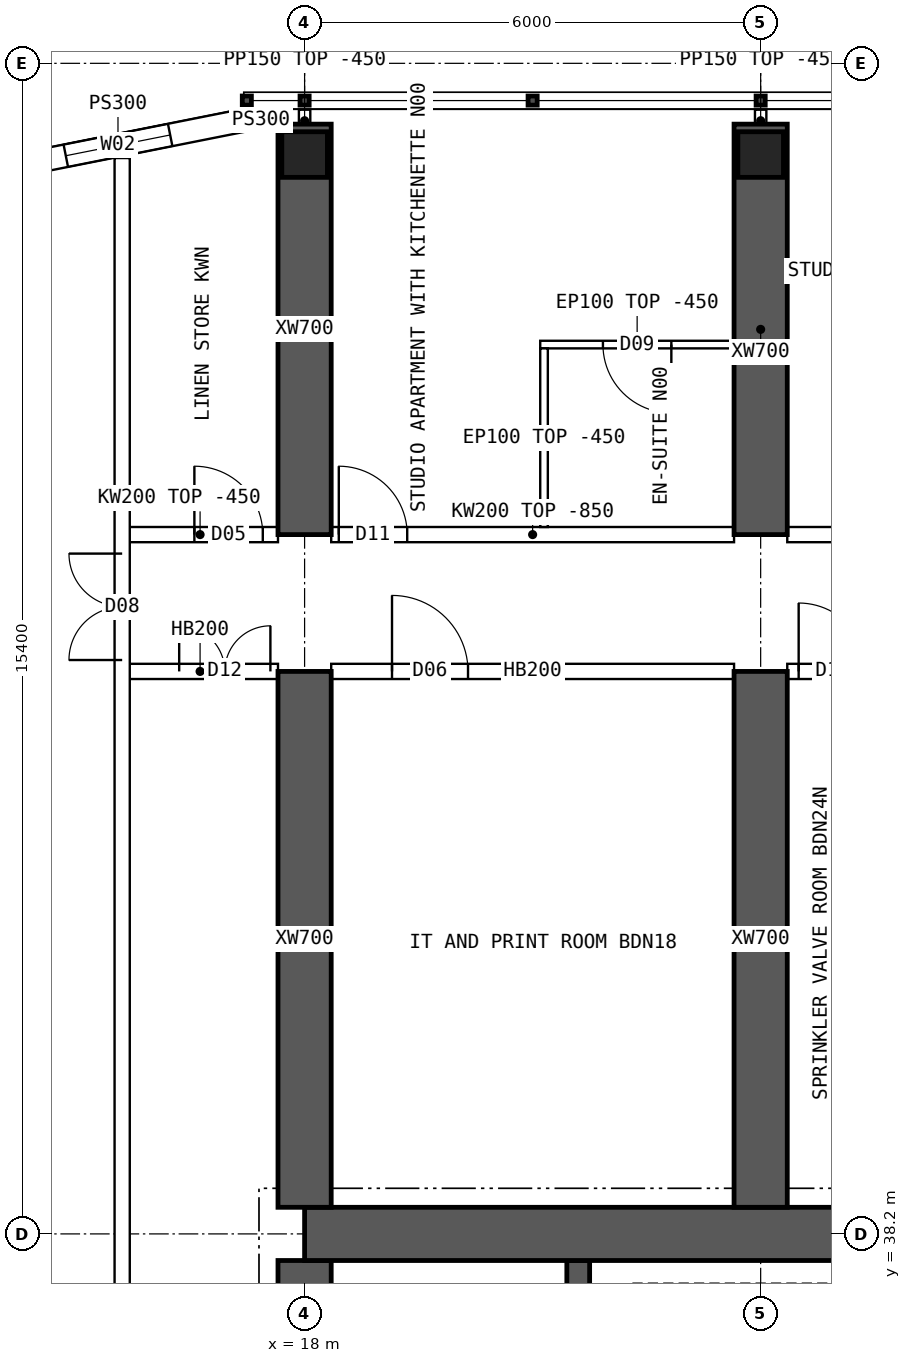
"""IFC4 building model, lengths in metres.
Left out: names, types, materials, properties, quantities, classifications, styles, units other than length and angle.
Written with IfcOpenShell. Run it as: python <this file> out.ifc"""

import sys

from ifc_helpers import new_model, si_unit, direction, frame, frame_2d, origin, origin_2d, place, context, subcontext, project, spatial, polyline, rectangle, hollow_rectangle, outline, extrude, element, fill, save


model = new_model("IFC4")
c1 = context("Model", 3, precision=1e-05, world=origin(), true_north=direction((0.0, 1.0)))
c2 = subcontext(c1, "Body", "Model", "MODEL_VIEW")
j1 = project(units=[si_unit("LENGTHUNIT", "METRE"), si_unit("PLANEANGLEUNIT", "RADIAN")], contexts=[c1])
p1 = place(None, origin())
s1 = spatial("IfcSite", under=j1, at=p1, CompositionType="ELEMENT")
p2 = place(p1, origin())
s2 = spatial("IfcBuilding", under=s1, at=p2, CompositionType="ELEMENT")
p3 = place(p2, frame((0.0, 0.0, 212.8)))
s3 = spatial("IfcBuildingStorey", under=s2, at=p3, CompositionType="ELEMENT", Elevation=212.8)
for number, where, z_axis, x_axis in (
    (1, (18.0, 52.4, 0.0), (0.0, 0.0, 1.0), (1.0, 0.0, 0.0)),
    (2, (24.0, 52.4, 0.0), (0.0, 0.0, 1.0), (1.0, 0.0, 0.0)),
):
    element("IfcColumn", number, at=place(p3, frame(where, z_axis=z_axis, x_axis=x_axis)), inside=s3, PredefinedType="COLUMN", context=c2, shape_type="SweptSolid", body=[
        extrude(hollow_rectangle(XDim=0.6, YDim=0.6, WallThickness=0.06, at=origin_2d()), origin(), (0.0, 0.0, 1.0), 3.75),
    ])
p4 = place(p3, frame((18.0, 38.2, 0.0), z_axis=(0.0, 0.0, 1.0), x_axis=(1.0, 0.0, 0.0)))
e3 = element("IfcWall", 3, at=p4, inside=s3, PredefinedType="SHEAR", context=c2, shape_type="SweptSolid", body=[
    extrude(rectangle(XDim=48.0, YDim=0.7, at=frame_2d((24.0, 0.0))), origin(), (0.0, 0.0, 1.0), 3.75),
])
p5 = place(p3, frame((18.0, 26.15, 0.0), z_axis=(0.0, 0.0, 1.0), x_axis=(0.0, 1.0, 0.0)))
e4 = element("IfcWall", 4, at=p5, inside=s3, PredefinedType="SHEAR", context=c2, shape_type="SweptSolid", body=[
    extrude(rectangle(XDim=11.7, YDim=0.7, at=frame_2d((5.85, 0.0))), origin(), (0.0, 0.0, 1.0), 3.75),
])
p6 = place(p5, frame((5.15, 0.0, 0.0)))
e5 = element("IfcOpeningElement", 5, at=p6, cuts=e4, PredefinedType="OPENING", context=c2, shape_type="SweptSolid", body=[
    extrude(rectangle(XDim=1.2, YDim=2.1, at=frame_2d((0.6, 1.05))), frame((0.0, 0.36, 0.0), z_axis=(0.0, -1.0, 0.0), x_axis=(1.0, 0.0, 0.0)), (0.0, 0.0, 1.0), 0.72),
])
p7 = place(p3, frame((21.6, 34.75, 0.0), z_axis=(0.0, 0.0, 1.0), x_axis=(0.0, 1.0, 0.0)))
e6 = element("IfcWall", 6, at=p7, inside=s3, PredefinedType="SHEAR", context=c2, shape_type="SweptSolid", body=[
    extrude(rectangle(XDim=3.1, YDim=0.3, at=frame_2d((1.55, 0.0))), origin(), (0.0, 0.0, 1.0), 3.75),
])
p8 = place(p3, frame((18.0, 47.4, 0.0), z_axis=(0.0, 0.0, 1.0), x_axis=(0.0, 1.0, 0.0)))
e7 = element("IfcWall", 7, at=p8, inside=s3, PredefinedType="SHEAR", context=c2, shape_type="SweptSolid", body=[
    extrude(rectangle(XDim=5.4, YDim=0.7, at=frame_2d((2.7, 0.0))), origin(), (0.0, 0.0, 1.0), 3.75),
])
p9 = place(p3, frame((18.0, 38.55, 0.0), z_axis=(0.0, 0.0, 1.0), x_axis=(0.0, 1.0, 0.0)))
e8 = element("IfcWall", 8, at=p9, inside=s3, PredefinedType="SHEAR", context=c2, shape_type="SweptSolid", body=[
    extrude(rectangle(XDim=7.05, YDim=0.7, at=frame_2d((3.525, 0.0))), origin(), (0.0, 0.0, 1.0), 3.75),
])
p10 = place(p3, frame((24.0, 47.4, 0.0), z_axis=(0.0, 0.0, 1.0), x_axis=(0.0, 1.0, 0.0)))
e9 = element("IfcWall", 9, at=p10, inside=s3, PredefinedType="SHEAR", context=c2, shape_type="SweptSolid", body=[
    extrude(rectangle(XDim=5.4, YDim=0.7, at=frame_2d((2.7, 0.0))), origin(), (0.0, 0.0, 1.0), 3.75),
])
p11 = place(p3, frame((24.0, 38.55, 0.0), z_axis=(0.0, 0.0, 1.0), x_axis=(0.0, 1.0, 0.0)))
e10 = element("IfcWall", 10, at=p11, inside=s3, PredefinedType="SHEAR", context=c2, shape_type="SweptSolid", body=[
    extrude(rectangle(XDim=7.05, YDim=0.7, at=frame_2d((3.525, 0.0))), origin(), (0.0, 0.0, 1.0), 3.75),
])
p12 = place(p3, frame((17.2, 52.85, 0.0), z_axis=(0.0, 0.0, 1.0), x_axis=(-0.98078325777, -0.195100490205, 0.0)))
e11 = element("IfcWall", 11, at=p12, inside=s3, PredefinedType="SOLIDWALL", context=c2, shape_type="SweptSolid", body=[
    extrude(outline(polyline([(-0.03, -0.15), (3.405, -0.15), (3.345, 0.15), (0.03, 0.15), (-0.03, -0.15)])), origin(), (0.0, 0.0, 1.0), 3.3),
])
p13 = place(p12, frame((0.988, 0.0, 0.9)))
e12 = element("IfcOpeningElement", 12, at=p13, cuts=e11, PredefinedType="OPENING", context=c2, shape_type="SweptSolid", body=[
    extrude(rectangle(XDim=1.4, YDim=1.8, at=frame_2d((0.7, 0.9))), frame((0.0, 0.16, 0.0), z_axis=(0.0, -1.0, 0.0), x_axis=(1.0, 0.0, 0.0)), (0.0, 0.0, 1.0), 0.32),
])
p14 = place(p3, frame((17.2, 52.85, 0.0), z_axis=(0.0, 0.0, 1.0), x_axis=(1.0, 0.0, 0.0)))
e13 = element("IfcWall", 13, at=p14, inside=s3, PredefinedType="SOLIDWALL", context=c2, shape_type="SweptSolid", body=[
    extrude(rectangle(XDim=0.45, YDim=0.3, at=frame_2d((0.225, 0.0))), origin(), (0.0, 0.0, 1.0), 3.3),
])
p15 = place(p3, frame((15.6, 47.4, 0.0), z_axis=(0.0, 0.0, 1.0), x_axis=(1.0, 0.0, 0.0)))
e14 = element("IfcWall", 14, at=p15, inside=s3, PredefinedType="SOLIDWALL", context=c2, shape_type="SweptSolid", body=[
    extrude(rectangle(XDim=2.05, YDim=0.2, at=frame_2d((1.025, 0.0))), origin(), (0.0, 0.0, 1.0), 3.3),
])
p16 = place(p15, frame((0.95, 0.0, 0.0)))
e15 = element("IfcOpeningElement", 15, at=p16, cuts=e14, PredefinedType="OPENING", context=c2, shape_type="SweptSolid", body=[
    extrude(rectangle(XDim=0.9, YDim=2.1, at=frame_2d((0.45, 1.05))), frame((0.0, 0.11, 0.0), z_axis=(0.0, -1.0, 0.0), x_axis=(1.0, 0.0, 0.0)), (0.0, 0.0, 1.0), 0.22),
])
p17 = place(p3, frame((15.6, 45.6, 0.0), z_axis=(0.0, 0.0, 1.0), x_axis=(1.0, 0.0, 0.0)))
e16 = element("IfcWall", 16, at=p17, inside=s3, PredefinedType="SOLIDWALL", context=c2, shape_type="SweptSolid", body=[
    extrude(rectangle(XDim=2.05, YDim=0.2, at=frame_2d((1.025, 0.0))), origin(), (0.0, 0.0, 1.0), 3.3),
])
p18 = place(p17, frame((0.75, 0.0, 0.0)))
e17 = element("IfcOpeningElement", 17, at=p18, cuts=e16, PredefinedType="OPENING", context=c2, shape_type="SweptSolid", body=[
    extrude(rectangle(XDim=1.2, YDim=2.1, at=frame_2d((0.6, 1.05))), frame((0.0, 0.11, 0.0), z_axis=(0.0, -1.0, 0.0), x_axis=(1.0, 0.0, 0.0)), (0.0, 0.0, 1.0), 0.22),
])
p19 = place(p3, frame((18.35, 47.4, 0.0), z_axis=(0.0, 0.0, 1.0), x_axis=(1.0, 0.0, 0.0)))
e18 = element("IfcWall", 18, at=p19, inside=s3, PredefinedType="SOLIDWALL", context=c2, shape_type="SweptSolid", body=[
    extrude(outline(polyline([(0.0, 0.0), (5.3, 0.0), (5.3, 2.9), (0.0, 2.9), (0.0, 0.0)])), frame((0.0, 0.1, 0.0), z_axis=(0.0, -1.0, 0.0), x_axis=(1.0, 0.0, 0.0)), (0.0, 0.0, 1.0), 0.2),
])
p20 = place(p19, frame((0.1, 0.0, 0.0)))
e19 = element("IfcOpeningElement", 19, at=p20, cuts=e18, PredefinedType="OPENING", context=c2, shape_type="SweptSolid", body=[
    extrude(rectangle(XDim=0.9, YDim=2.1, at=frame_2d((0.45, 1.05))), frame((0.0, 0.11, 0.0), z_axis=(0.0, -1.0, 0.0), x_axis=(1.0, 0.0, 0.0)), (0.0, 0.0, 1.0), 0.22),
])
p21 = place(p3, frame((18.35, 45.6, 0.0), z_axis=(0.0, 0.0, 1.0), x_axis=(1.0, 0.0, 0.0)))
e20 = element("IfcWall", 20, at=p21, inside=s3, PredefinedType="SOLIDWALL", context=c2, shape_type="SweptSolid", body=[
    extrude(rectangle(XDim=5.3, YDim=0.2, at=frame_2d((2.65, 0.0))), origin(), (0.0, 0.0, 1.0), 3.3),
])
p22 = place(p21, frame((0.8, 0.0, 0.0)))
e21 = element("IfcOpeningElement", 21, at=p22, cuts=e20, PredefinedType="OPENING", context=c2, shape_type="SweptSolid", body=[
    extrude(rectangle(XDim=1.0, YDim=2.1, at=frame_2d((0.5, 1.05))), frame((0.0, 0.11, 0.0), z_axis=(0.0, -1.0, 0.0), x_axis=(1.0, 0.0, 0.0)), (0.0, 0.0, 1.0), 0.22),
])
p23 = place(p3, frame((24.35, 47.4, 0.0), z_axis=(0.0, 0.0, 1.0), x_axis=(1.0, 0.0, 0.0)))
e22 = element("IfcWall", 22, at=p23, inside=s3, PredefinedType="SOLIDWALL", context=c2, shape_type="SweptSolid", body=[
    extrude(outline(polyline([(0.0, 0.0), (5.3, 0.0), (5.3, 2.9), (0.0, 2.9), (0.0, 0.0)])), frame((0.0, 0.1, 0.0), z_axis=(0.0, -1.0, 0.0), x_axis=(1.0, 0.0, 0.0)), (0.0, 0.0, 1.0), 0.2),
])
p24 = place(p23, frame((2.3, 0.0, 0.0)))
e23 = element("IfcOpeningElement", 23, at=p24, cuts=e22, PredefinedType="OPENING", context=c2, shape_type="SweptSolid", body=[
    extrude(rectangle(XDim=0.9, YDim=2.1, at=frame_2d((0.45, 1.05))), frame((0.0, 0.11, 0.0), z_axis=(0.0, -1.0, 0.0), x_axis=(1.0, 0.0, 0.0)), (0.0, 0.0, 1.0), 0.22),
])
p25 = place(p3, frame((24.35, 45.6, 0.0), z_axis=(0.0, 0.0, 1.0), x_axis=(1.0, 0.0, 0.0)))
e24 = element("IfcWall", 24, at=p25, inside=s3, PredefinedType="SOLIDWALL", context=c2, shape_type="SweptSolid", body=[
    extrude(rectangle(XDim=5.3, YDim=0.2, at=frame_2d((2.65, 0.0))), origin(), (0.0, 0.0, 1.0), 3.3),
])
p26 = place(p25, frame((0.15, 0.0, 0.0)))
e25 = element("IfcOpeningElement", 25, at=p26, cuts=e24, PredefinedType="OPENING", context=c2, shape_type="SweptSolid", body=[
    extrude(rectangle(XDim=0.9, YDim=2.1, at=frame_2d((0.45, 1.05))), frame((0.0, 0.11, 0.0), z_axis=(0.0, -1.0, 0.0), x_axis=(1.0, 0.0, 0.0)), (0.0, 0.0, 1.0), 0.22),
])
p27 = place(p25, frame((2.28, 0.0, 0.0)))
e26 = element("IfcOpeningElement", 26, at=p27, cuts=e24, PredefinedType="OPENING", context=c2, shape_type="SweptSolid", body=[
    extrude(rectangle(XDim=0.9, YDim=2.1, at=frame_2d((0.45, 1.05))), frame((0.0, 0.11, 0.0), z_axis=(0.0, -1.0, 0.0), x_axis=(1.0, 0.0, 0.0)), (0.0, 0.0, 1.0), 0.22),
])
p28 = place(p3, frame((21.1, 49.9, 0.0), z_axis=(0.0, 0.0, 1.0), x_axis=(1.0, 0.0, 0.0)))
e27 = element("IfcWall", 27, at=p28, inside=s3, PredefinedType="PARTITIONING", context=c2, shape_type="SweptSolid", body=[
    extrude(rectangle(XDim=2.55, YDim=0.1, at=frame_2d((1.275, 0.0))), origin(), (0.0, 0.0, 1.0), 3.3),
])
p29 = place(p28, frame((0.825, 0.0, 0.0)))
e28 = element("IfcOpeningElement", 28, at=p29, cuts=e27, PredefinedType="OPENING", context=c2, shape_type="SweptSolid", body=[
    extrude(rectangle(XDim=0.9, YDim=2.1, at=frame_2d((0.45, 1.05))), frame((0.0, 0.06, 0.0), z_axis=(0.0, -1.0, 0.0), x_axis=(1.0, 0.0, 0.0)), (0.0, 0.0, 1.0), 0.12),
])
p30 = place(p3, frame((21.15, 49.85, 0.0), z_axis=(0.0, 0.0, 1.0), x_axis=(0.0, -1.0, 0.0)))
e29 = element("IfcWall", 29, at=p30, inside=s3, PredefinedType="PARTITIONING", context=c2, shape_type="SweptSolid", body=[
    extrude(outline(polyline([(0.0, 0.0), (2.35, 0.0), (2.35, 2.9), (2.302, 2.9), (2.3, 3.3), (0.0, 3.3), (0.0, 0.0)])), frame((0.0, 0.05, 0.0), z_axis=(0.0, -1.0, 0.0), x_axis=(1.0, 0.0, 0.0)), (0.0, 0.0, 1.0), 0.1),
])
p31 = place(p3, frame((15.6, 11.646, 0.0), z_axis=(0.0, 0.0, 1.0), x_axis=(0.0, 1.0, 0.0)))
e30 = element("IfcWall", 30, at=p31, inside=s3, PredefinedType="SOLIDWALL", context=c2, shape_type="SweptSolid", body=[
    extrude(rectangle(XDim=40.708, YDim=0.2, at=frame_2d((20.354, 0.0))), origin(), (0.0, 0.0, 1.0), 3.3),
])
p32 = place(p31, frame((13.434, 0.0, 0.0)))
e31 = element("IfcOpeningElement", 31, at=p32, cuts=e30, PredefinedType="OPENING", context=c2, shape_type="SweptSolid", body=[
    extrude(rectangle(XDim=1.2, YDim=2.1, at=frame_2d((0.6, 1.05))), frame((0.0, 0.11, 0.0), z_axis=(0.0, -1.0, 0.0), x_axis=(1.0, 0.0, 0.0)), (0.0, 0.0, 1.0), 0.22),
])
p33 = place(p31, frame((5.104, 0.0, 0.0)))
e32 = element("IfcOpeningElement", 32, at=p33, cuts=e30, PredefinedType="OPENING", context=c2, shape_type="SweptSolid", body=[
    extrude(rectangle(XDim=1.4, YDim=2.1, at=frame_2d((0.7, 1.05))), frame((0.0, 0.11, 0.0), z_axis=(0.0, -1.0, 0.0), x_axis=(1.0, 0.0, 0.0)), (0.0, 0.0, 1.0), 0.22),
])
p34 = place(p31, frame((34.104, 0.0, 0.0)))
e33 = element("IfcOpeningElement", 33, at=p34, cuts=e30, PredefinedType="OPENING", context=c2, shape_type="SweptSolid", body=[
    extrude(rectangle(XDim=1.4, YDim=2.1, at=frame_2d((0.7, 1.05))), frame((0.0, 0.11, 0.0), z_axis=(0.0, -1.0, 0.0), x_axis=(1.0, 0.0, 0.0)), (0.0, 0.0, 1.0), 0.22),
])
for number, where, z_axis, x_axis in (
    (34, (18.0, 52.7, 0.0), (0.0, 0.0, 1.0), (0.0, 1.0, 0.0)),
    (35, (24.0, 52.7, 0.0), (0.0, 0.0, 1.0), (0.0, 1.0, 0.0)),
):
    element("IfcWall", number, at=place(p3, frame(where, z_axis=z_axis, x_axis=x_axis)), inside=s3, PredefinedType="PARTITIONING", context=c2, shape_type="SweptSolid", body=[
        extrude(rectangle(XDim=0.29, YDim=0.15, at=frame_2d((0.145, 0.0))), origin(), (0.0, 0.0, 1.0), 3.3),
    ])
p35 = place(p13, origin())
e36 = element("IfcWindow", 36, at=p35, inside=s3, PartitioningType="SINGLE_PANEL", PredefinedType="WINDOW", context=c2, shape_type="SweptSolid", body=[
    extrude(rectangle(XDim=1.4, YDim=1.8, at=frame_2d((0.7, 0.9))), frame((0.0, 0.03, 0.0), z_axis=(0.0, -1.0, 0.0), x_axis=(1.0, 0.0, 0.0)), (0.0, 0.0, 1.0), 0.06),
])
fill(e12, e36)
p36 = place(p18, origin())
e37 = element("IfcDoor", 37, at=p36, inside=s3, OperationType="DOUBLE_DOOR_SINGLE_SWING", PredefinedType="DOOR", context=c2, shape_type="SweptSolid", body=[
    extrude(rectangle(XDim=1.2, YDim=2.1, at=frame_2d((0.6, 1.05))), frame((0.0, 0.025, 0.0), z_axis=(0.0, -1.0, 0.0), x_axis=(1.0, 0.0, 0.0)), (0.0, 0.0, 1.0), 0.05),
])
fill(e17, e37)
p37 = place(p29, origin())
e38 = element("IfcDoor", 38, at=p37, inside=s3, OperationType="SINGLE_SWING_RIGHT", PredefinedType="DOOR", context=c2, shape_type="SweptSolid", body=[
    extrude(rectangle(XDim=0.9, YDim=2.1, at=frame_2d((0.45, 1.05))), frame((0.0, 0.025, 0.0), z_axis=(0.0, -1.0, 0.0), x_axis=(1.0, 0.0, 0.0)), (0.0, 0.0, 1.0), 0.05),
])
fill(e28, e38)
p38 = place(p20, origin())
e39 = element("IfcDoor", 39, at=p38, inside=s3, OperationType="SINGLE_SWING_LEFT", PredefinedType="DOOR", context=c2, shape_type="SweptSolid", body=[
    extrude(rectangle(XDim=0.9, YDim=2.1, at=frame_2d((0.45, 1.05))), frame((0.0, 0.025, 0.0), z_axis=(0.0, -1.0, 0.0), x_axis=(1.0, 0.0, 0.0)), (0.0, 0.0, 1.0), 0.05),
])
fill(e19, e39)
p39 = place(p22, origin())
e40 = element("IfcDoor", 40, at=p39, inside=s3, OperationType="SINGLE_SWING_LEFT", PredefinedType="DOOR", context=c2, shape_type="SweptSolid", body=[
    extrude(rectangle(XDim=1.0, YDim=2.1, at=frame_2d((0.5, 1.05))), frame((0.0, 0.025, 0.0), z_axis=(0.0, -1.0, 0.0), x_axis=(1.0, 0.0, 0.0)), (0.0, 0.0, 1.0), 0.05),
])
fill(e21, e40)
p40 = place(p26, origin())
e41 = element("IfcDoor", 41, at=p40, inside=s3, OperationType="SINGLE_SWING_LEFT", PredefinedType="DOOR", context=c2, shape_type="SweptSolid", body=[
    extrude(rectangle(XDim=0.9, YDim=2.1, at=frame_2d((0.45, 1.05))), frame((0.0, 0.025, 0.0), z_axis=(0.0, -1.0, 0.0), x_axis=(1.0, 0.0, 0.0)), (0.0, 0.0, 1.0), 0.05),
])
fill(e25, e41)
p41 = place(p34, origin())
e42 = element("IfcDoor", 42, at=p41, inside=s3, OperationType="DOUBLE_DOOR_SINGLE_SWING", PredefinedType="DOOR", context=c2, shape_type="SweptSolid", body=[
    extrude(rectangle(XDim=1.4, YDim=2.1, at=frame_2d((0.7, 1.05))), frame((0.0, 0.025, 0.0), z_axis=(0.0, -1.0, 0.0), x_axis=(1.0, 0.0, 0.0)), (0.0, 0.0, 1.0), 0.05),
])
fill(e33, e42)
p42 = place(p16, origin())
e43 = element("IfcDoor", 43, at=p42, inside=s3, OperationType="SINGLE_SWING_LEFT", PredefinedType="DOOR", context=c2, shape_type="SweptSolid", body=[
    extrude(rectangle(XDim=0.9, YDim=2.1, at=frame_2d((0.45, 1.05))), frame((0.0, 0.025, 0.0), z_axis=(0.0, -1.0, 0.0), x_axis=(1.0, 0.0, 0.0)), (0.0, 0.0, 1.0), 0.05),
])
fill(e15, e43)
save(model, sys.argv[1])
